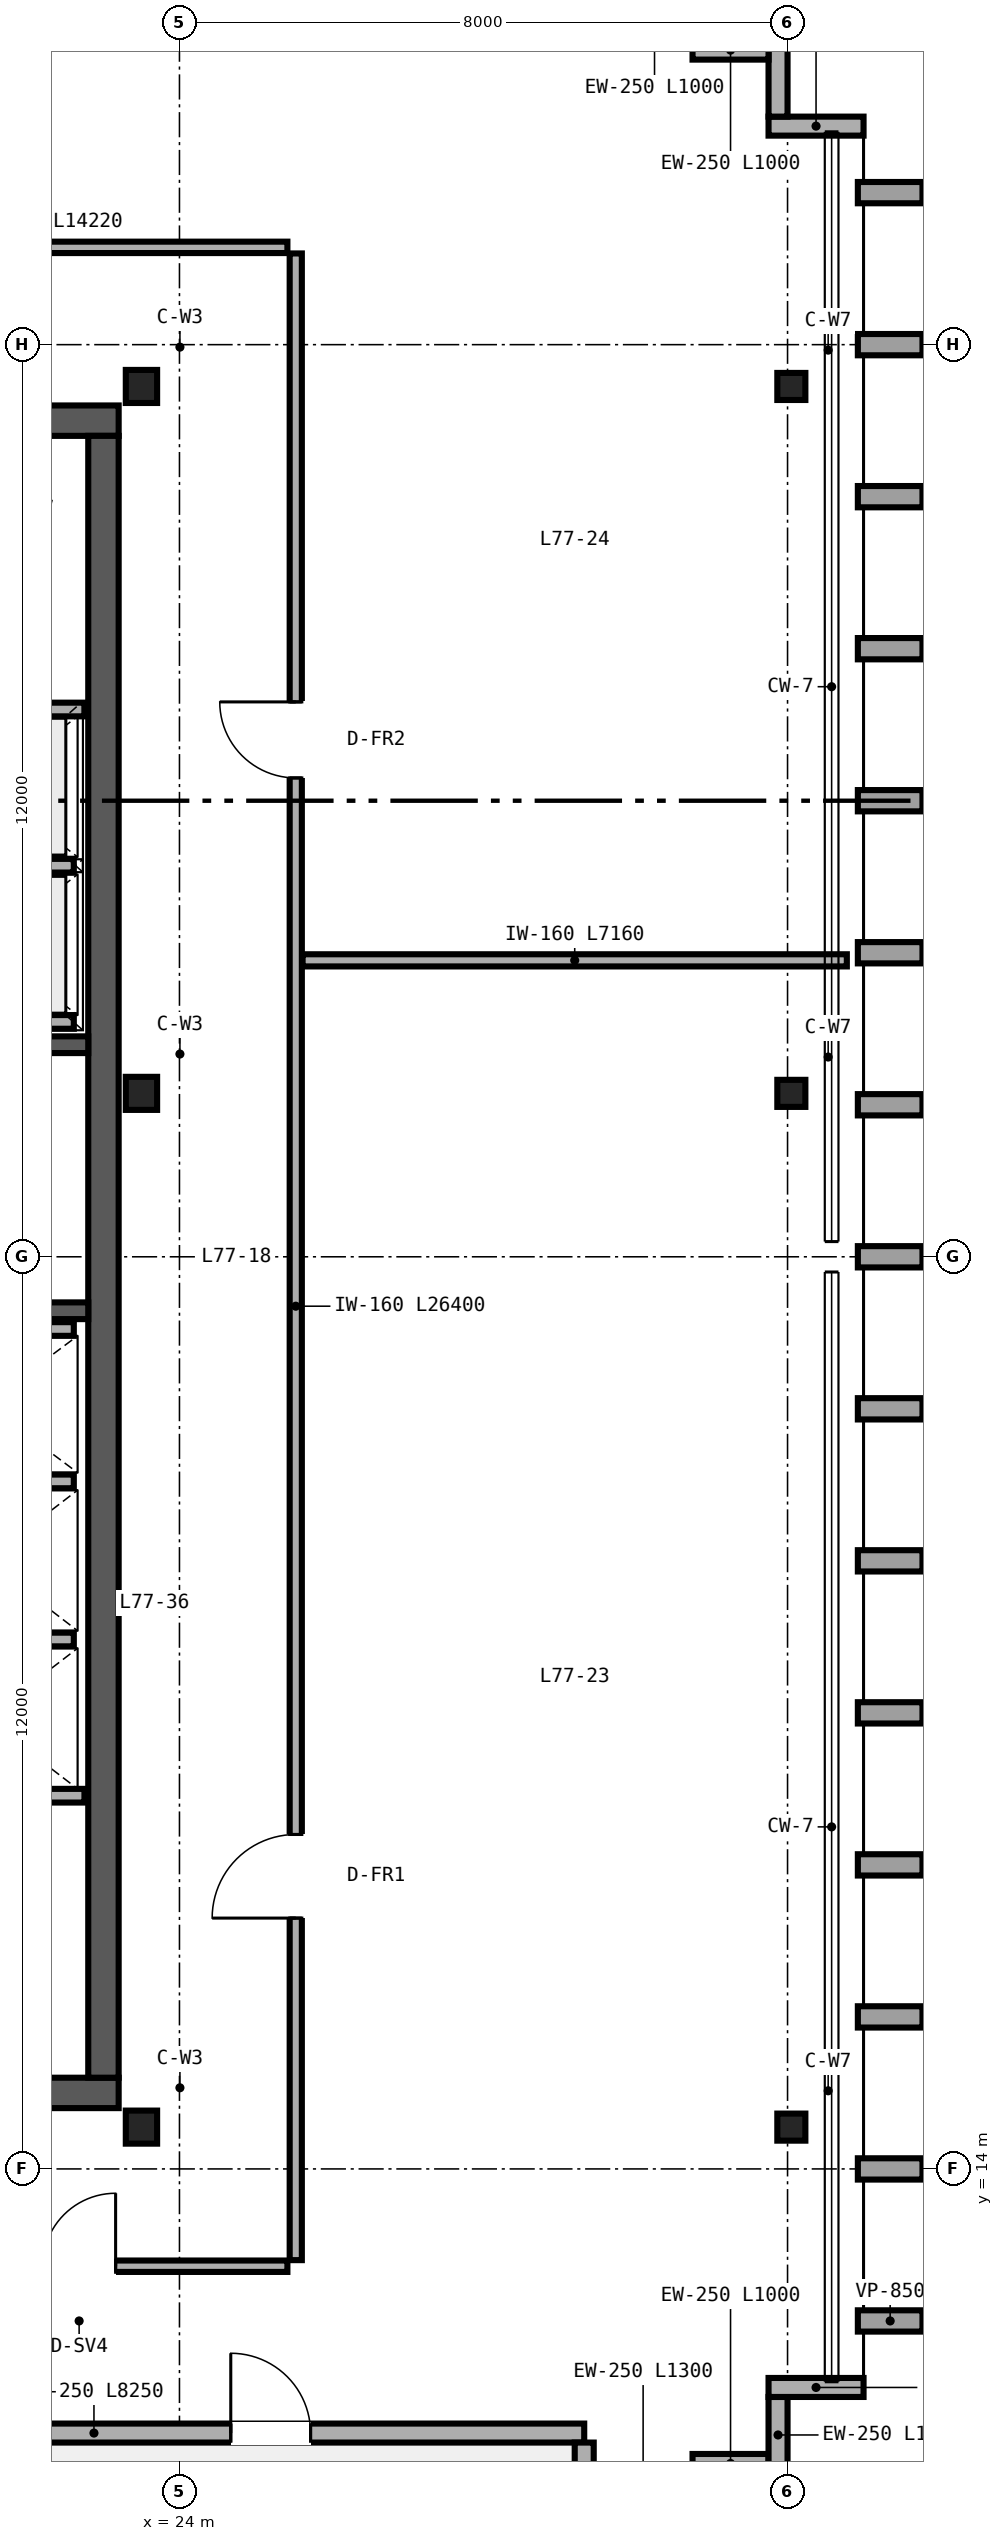
"""IFC4 building model, lengths in metres.
Left out: names, types, materials, properties, quantities, classifications, styles, units other than length and angle.
Written with IfcOpenShell. Run it as: python <this file> out.ifc"""

import sys

from ifc_helpers import new_model, si_unit, direction, frame, frame_2d, origin, origin_2d, place, context, subcontext, project, spatial, rectangle, i_section, extrude, source, transform, mapped, element, fill, save


model = new_model("IFC4")
c1 = context("Model", 3, precision=1e-05, world=origin(), true_north=direction((0.0, 1.0)))
c2 = subcontext(c1, "Body", "Model", "MODEL_VIEW")
j1 = project(units=[si_unit("LENGTHUNIT", "METRE"), si_unit("PLANEANGLEUNIT", "RADIAN")], contexts=[c1])
p1 = place(None, origin())
s1 = spatial("IfcSite", under=j1, at=p1, CompositionType="ELEMENT")
p2 = place(p1, origin())
s2 = spatial("IfcBuilding", under=s1, at=p2, CompositionType="ELEMENT")
p3 = place(p2, frame((0.0, 0.0, 301.2)))
s3 = spatial("IfcBuildingStorey", under=s2, at=p3, CompositionType="ELEMENT", Elevation=301.2)
p4 = place(p3, frame((10.8, 15.0, 0.0), z_axis=(0.0, 0.0, 1.0), x_axis=(1.0, 0.0, 0.0)))
e1 = element("IfcWall", 1, at=p4, inside=s3, PredefinedType="SHEAR", context=c2, shape_type="SweptSolid", body=[
    extrude(rectangle(XDim=12.4, YDim=0.4, at=frame_2d((6.2, 0.0))), origin(), (0.0, 0.0, 1.0), 3.92),
])
p5 = place(p4, frame((10.1, 0.0, 0.0)))
e2 = element("IfcOpeningElement", 2, at=p5, cuts=e1, PredefinedType="OPENING", context=c2, shape_type="SweptSolid", body=[
    extrude(rectangle(XDim=1.0, YDim=2.15, at=frame_2d((0.5, 1.075))), frame((0.0, 0.21, 0.0), z_axis=(0.0, -1.0, 0.0), x_axis=(1.0, 0.0, 0.0)), (0.0, 0.0, 1.0), 0.42),
])
p6 = place(p3, frame((10.8, 37.0, 0.0), z_axis=(0.0, 0.0, 1.0), x_axis=(1.0, 0.0, 0.0)))
e3 = element("IfcWall", 3, at=p6, inside=s3, PredefinedType="SHEAR", context=c2, shape_type="SweptSolid", body=[
    extrude(rectangle(XDim=12.4, YDim=0.4, at=frame_2d((6.2, 0.0))), origin(), (0.0, 0.0, 1.0), 3.92),
])
p7 = place(p6, frame((8.78, 0.0, 0.0)))
e4 = element("IfcOpeningElement", 4, at=p7, cuts=e3, PredefinedType="OPENING", context=c2, shape_type="SweptSolid", body=[
    extrude(rectangle(XDim=1.0, YDim=2.15, at=frame_2d((0.5, 1.075))), frame((0.0, 0.21, 0.0), z_axis=(0.0, -1.0, 0.0), x_axis=(1.0, 0.0, 0.0)), (0.0, 0.0, 1.0), 0.42),
])
p8 = place(p3, frame((23.0, 15.2, 0.0), z_axis=(0.0, 0.0, 1.0), x_axis=(0.0, 1.0, 0.0)))
e5 = element("IfcWall", 5, at=p8, inside=s3, PredefinedType="SHEAR", context=c2, shape_type="SweptSolid", body=[
    extrude(rectangle(XDim=21.6, YDim=0.4, at=frame_2d((10.8, 0.0))), origin(), (0.0, 0.0, 1.0), 3.92),
])
p9 = place(p3, frame((14.18, 25.29, 0.0), z_axis=(0.0, 0.0, 1.0), x_axis=(1.0, 0.0, 0.0)))
e6 = element("IfcWall", 6, at=p9, inside=s3, PredefinedType="SHEAR", context=c2, shape_type="SweptSolid", body=[
    extrude(rectangle(XDim=8.62, YDim=0.22, at=frame_2d((4.31, 0.0))), origin(), (0.0, 0.0, 1.0), 4.0),
])
p10 = place(p9, frame((0.47, 0.0, 0.0)))
e7 = element("IfcOpeningElement", 7, at=p10, cuts=e6, PredefinedType="OPENING", context=c2, shape_type="SweptSolid", body=[
    extrude(rectangle(XDim=1.05, YDim=2.15, at=frame_2d((0.525, 1.075))), frame((0.0, 0.12, 0.0), z_axis=(0.0, -1.0, 0.0), x_axis=(1.0, 0.0, 0.0)), (0.0, 0.0, 1.0), 0.24),
])
p11 = place(p3, frame((14.18, 28.79, 0.0), z_axis=(0.0, 0.0, 1.0), x_axis=(1.0, 0.0, 0.0)))
e8 = element("IfcWall", 8, at=p11, inside=s3, PredefinedType="SHEAR", context=c2, shape_type="SweptSolid", body=[
    extrude(rectangle(XDim=8.62, YDim=0.22, at=frame_2d((4.31, 0.0))), origin(), (0.0, 0.0, 1.0), 4.0),
])
m1 = source(origin(), c2, "Body", "SweptSolid", [
    extrude(i_section(OverallWidth=0.412, OverallDepth=0.435, WebThickness=0.036, FlangeThickness=0.057, FilletRadius=0.025, at=origin_2d()), origin(), (0.0, 0.0, 1.0), 3.92),
])
for number, where, z_axis, x_axis in (
    (9, (23.5, 14.55, 0.0), (0.0, 0.0, 1.0), (1.0, 0.0, 0.0)),
    (10, (23.5, 28.15, 0.0), (0.0, 0.0, 1.0), (1.0, 0.0, 0.0)),
    (11, (23.5, 37.45, 0.0), (0.0, 0.0, 1.0), (1.0, 0.0, 0.0)),
):
    element("IfcColumn", number, at=place(p3, frame(where, z_axis=z_axis, x_axis=x_axis)), inside=s3, PredefinedType="COLUMN", context=c2, shape_type="MappedRepresentation", body=[
        mapped(m1, transform((0.0, 0.0, 0.0), scale=1.0)),
    ])
m2 = source(origin(), c2, "Body", "SweptSolid", [
    extrude(i_section(OverallWidth=0.369, OverallDepth=0.356, WebThickness=0.011, FlangeThickness=0.018, FilletRadius=0.025, at=origin_2d()), origin(), (0.0, 0.0, 1.0), 3.92),
])
for number, where, z_axis, x_axis in (
    (12, (32.05, 14.55, 0.0), (0.0, 0.0, 1.0), (1.0, 0.0, 0.0)),
    (13, (32.05, 28.15, 0.0), (0.0, 0.0, 1.0), (1.0, 0.0, 0.0)),
    (14, (32.05, 37.45, 0.0), (0.0, 0.0, 1.0), (1.0, 0.0, 0.0)),
):
    element("IfcColumn", number, at=place(p3, frame(where, z_axis=z_axis, x_axis=x_axis)), inside=s3, PredefinedType="COLUMN", context=c2, shape_type="MappedRepresentation", body=[
        mapped(m2, transform((0.0, 0.0, 0.0), scale=1.0)),
    ])
for number, where, z_axis, x_axis in (
    (15, (30.75, 10.125, 0.0), (0.0, 0.0, 1.0), (1.0, 0.0, 0.0)),
    (16, (31.875, 10.0, 0.0), (0.0, 0.0, 1.0), (0.0, 1.0, 0.0)),
):
    element("IfcWall", number, at=place(p3, frame(where, z_axis=z_axis, x_axis=x_axis)), inside=s3, PredefinedType="SOLIDWALL", context=c2, shape_type="SweptSolid", body=[
        extrude(rectangle(XDim=1.0, YDim=0.25, at=frame_2d((0.5, 0.0))), origin(), (0.0, 0.0, 1.0), 3.92),
    ])
for number, where, z_axis, x_axis in (
    (17, (31.75, 11.125, 0.0), (0.0, 0.0, 1.0), (1.0, 0.0, 0.0)),
    (18, (33.0, 40.875, 0.0), (0.0, 0.0, 1.0), (-1.0, 0.0, 0.0)),
):
    element("IfcWall", number, at=place(p3, frame(where, z_axis=z_axis, x_axis=x_axis)), inside=s3, PredefinedType="SOLIDWALL", context=c2, shape_type="SweptSolid", body=[
        extrude(rectangle(XDim=1.25, YDim=0.25, at=frame_2d((0.625, 0.0))), origin(), (0.0, 0.0, 1.0), 3.92),
    ])
for number, where, z_axis, x_axis in (
    (19, (31.875, 41.0, 0.0), (0.0, 0.0, 1.0), (0.0, 1.0, 0.0)),
    (20, (31.75, 41.875, 0.0), (0.0, 0.0, 1.0), (-1.0, 0.0, 0.0)),
):
    element("IfcWall", number, at=place(p3, frame(where, z_axis=z_axis, x_axis=x_axis)), inside=s3, PredefinedType="SOLIDWALL", context=c2, shape_type="SweptSolid", body=[
        extrude(rectangle(XDim=1.0, YDim=0.25, at=frame_2d((0.5, 0.0))), origin(), (0.0, 0.0, 1.0), 3.92),
    ])
p12 = place(p3, frame((21.075, 10.525, 0.0), z_axis=(0.0, 0.0, 1.0), x_axis=(1.0, 0.0, 0.0)))
e21 = element("IfcWall", 21, at=p12, inside=s3, PredefinedType="SOLIDWALL", context=c2, shape_type="SweptSolid", body=[
    extrude(rectangle(XDim=8.25, YDim=0.25, at=frame_2d((4.125, 0.0))), origin(), (0.0, 0.0, 1.0), 3.92),
])
p13 = place(p12, frame((3.6, 0.0, 0.0)))
e22 = element("IfcOpeningElement", 22, at=p13, cuts=e21, PredefinedType="OPENING", context=c2, shape_type="SweptSolid", body=[
    extrude(rectangle(XDim=1.05, YDim=2.15, at=frame_2d((0.525, 1.075))), frame((0.0, 0.135, 0.0), z_axis=(0.0, -1.0, 0.0), x_axis=(1.0, 0.0, 0.0)), (0.0, 0.0, 1.0), 0.27),
])
p14 = place(p3, frame((29.325, 8.1, 0.0), z_axis=(0.0, 0.0, 1.0), x_axis=(0.0, 1.0, 0.0)))
e23 = element("IfcWall", 23, at=p14, inside=s3, PredefinedType="SOLIDWALL", context=c2, shape_type="SweptSolid", body=[
    extrude(rectangle(XDim=2.3, YDim=0.25, at=frame_2d((1.15, 0.0))), origin(), (0.0, 0.0, 1.0), 3.92),
])
p15 = place(p3, frame((20.12, 18.91, 0.0), z_axis=(0.0, 0.0, 1.0), x_axis=(1.0, 0.0, 0.0)))
e24 = element("IfcWall", 24, at=p15, inside=s3, PredefinedType="SOLIDWALL", context=c2, shape_type="SweptSolid", body=[
    extrude(rectangle(XDim=2.63, YDim=0.18, at=frame_2d((1.315, 0.0))), origin(), (0.0, 0.0, 1.0), 3.92),
])
p16 = place(p3, frame((20.25, 25.05, 0.0), z_axis=(0.0, 0.0, 1.0), x_axis=(1.0, 0.0, 0.0)))
e25 = element("IfcWall", 25, at=p16, inside=s3, PredefinedType="SOLIDWALL", context=c2, shape_type="SweptSolid", body=[
    extrude(rectangle(XDim=2.36, YDim=0.18, at=frame_2d((1.18, 0.0))), origin(), (0.0, 0.0, 1.0), 3.92),
])
p17 = place(p3, frame((20.25, 20.965, 0.0), z_axis=(0.0, 0.0, 1.0), x_axis=(1.0, 0.0, 0.0)))
e26 = element("IfcWall", 26, at=p17, inside=s3, PredefinedType="SOLIDWALL", context=c2, shape_type="SweptSolid", body=[
    extrude(rectangle(XDim=2.36, YDim=0.18, at=frame_2d((1.18, 0.0))), origin(), (0.0, 0.0, 1.0), 3.02),
])
for number, where, z_axis, x_axis in (
    (27, (20.25, 23.045, 0.0), (0.0, 0.0, 1.0), (1.0, 0.0, 0.0)),
    (28, (20.25, 29.09, 0.0), (0.0, 0.0, 1.0), (1.0, 0.0, 0.0)),
):
    element("IfcWall", number, at=place(p3, frame(where, z_axis=z_axis, x_axis=x_axis)), inside=s3, PredefinedType="SOLIDWALL", context=c2, shape_type="SweptSolid", body=[
        extrude(rectangle(XDim=2.36, YDim=0.18, at=frame_2d((1.18, 0.0))), origin(), (0.0, 0.0, 1.0), 3.92),
    ])
p18 = place(p3, frame((20.25, 33.2, 0.0), z_axis=(0.0, 0.0, 1.0), x_axis=(1.0, 0.0, 0.0)))
e29 = element("IfcWall", 29, at=p18, inside=s3, PredefinedType="SOLIDWALL", context=c2, shape_type="SweptSolid", body=[
    extrude(rectangle(XDim=2.5, YDim=0.18, at=frame_2d((1.25, 0.0))), origin(), (0.0, 0.0, 1.0), 3.92),
])
p19 = place(p3, frame((20.25, 31.145, 0.0), z_axis=(0.0, 0.0, 1.0), x_axis=(1.0, 0.0, 0.0)))
e30 = element("IfcWall", 30, at=p19, inside=s3, PredefinedType="SOLIDWALL", context=c2, shape_type="SweptSolid", body=[
    extrude(rectangle(XDim=2.36, YDim=0.18, at=frame_2d((1.18, 0.0))), origin(), (0.0, 0.0, 1.0), 3.92),
])
p20 = place(p3, frame((11.2, 12.72, 0.0), z_axis=(0.0, 0.0, 1.0), x_axis=(1.0, 0.0, 0.0)))
e31 = element("IfcWall", 31, at=p20, inside=s3, PredefinedType="PARTITIONING", context=c2, shape_type="SweptSolid", body=[
    extrude(rectangle(XDim=14.22, YDim=0.15, at=frame_2d((7.11, 0.0))), origin(), (0.0, 0.0, 1.0), 3.92),
])
p21 = place(p20, frame((3.8, 0.0, 0.0)))
e32 = element("IfcOpeningElement", 32, at=p21, cuts=e31, PredefinedType="OPENING", context=c2, shape_type="SweptSolid", body=[
    extrude(rectangle(XDim=1.0, YDim=2.15, at=frame_2d((0.5, 1.075))), frame((0.0, 0.085, 0.0), z_axis=(0.0, -1.0, 0.0), x_axis=(1.0, 0.0, 0.0)), (0.0, 0.0, 1.0), 0.17),
])
p22 = place(p20, frame((11.0, 0.0, 0.0)))
e33 = element("IfcOpeningElement", 33, at=p22, cuts=e31, PredefinedType="OPENING", context=c2, shape_type="SweptSolid", body=[
    extrude(rectangle(XDim=0.96, YDim=2.15, at=frame_2d((0.48, 1.075))), frame((0.0, 0.085, 0.0), z_axis=(0.0, -1.0, 0.0), x_axis=(1.0, 0.0, 0.0)), (0.0, 0.0, 1.0), 0.17),
])
p23 = place(p3, frame((25.53, 12.8, 0.0), z_axis=(0.0, 0.0, 1.0), x_axis=(0.0, 1.0, 0.0)))
e34 = element("IfcWall", 34, at=p23, inside=s3, PredefinedType="PARTITIONING", context=c2, shape_type="SweptSolid", body=[
    extrude(rectangle(XDim=26.4, YDim=0.16, at=frame_2d((13.2, 0.0))), origin(), (0.0, 0.0, 1.0), 3.064),
])
p24 = place(p23, frame((4.5, 0.0, 0.0)))
e35 = element("IfcOpeningElement", 35, at=p24, cuts=e34, PredefinedType="OPENING", context=c2, shape_type="SweptSolid", body=[
    extrude(rectangle(XDim=1.1, YDim=2.15, at=frame_2d((0.55, 1.075))), frame((0.0, 0.09, 0.0), z_axis=(0.0, -1.0, 0.0), x_axis=(1.0, 0.0, 0.0)), (0.0, 0.0, 1.0), 0.18),
])
p25 = place(p23, frame((19.5, 0.0, 0.0)))
e36 = element("IfcOpeningElement", 36, at=p25, cuts=e34, PredefinedType="OPENING", context=c2, shape_type="SweptSolid", body=[
    extrude(rectangle(XDim=1.0, YDim=2.15, at=frame_2d((0.5, 1.075))), frame((0.0, 0.09, 0.0), z_axis=(0.0, -1.0, 0.0), x_axis=(1.0, 0.0, 0.0)), (0.0, 0.0, 1.0), 0.18),
])
p26 = place(p3, frame((25.62, 29.9, 0.0), z_axis=(0.0, 0.0, 1.0), x_axis=(1.0, 0.0, 0.0)))
e37 = element("IfcWall", 37, at=p26, inside=s3, PredefinedType="PARTITIONING", context=c2, shape_type="SweptSolid", body=[
    extrude(rectangle(XDim=7.16, YDim=0.16, at=frame_2d((3.58, 0.0))), origin(), (0.0, 0.0, 1.0), 3.303),
])
p27 = place(p3, frame((11.2, 39.28, 0.0), z_axis=(0.0, 0.0, 1.0), x_axis=(1.0, 0.0, 0.0)))
e38 = element("IfcWall", 38, at=p27, inside=s3, PredefinedType="PARTITIONING", context=c2, shape_type="SweptSolid", body=[
    extrude(rectangle(XDim=14.22, YDim=0.15, at=frame_2d((7.11, 0.0))), origin(), (0.0, 0.0, 1.0), 3.92),
])
p28 = place(p27, frame((0.8, 0.0, 0.0)))
e39 = element("IfcOpeningElement", 39, at=p28, cuts=e38, PredefinedType="OPENING", context=c2, shape_type="SweptSolid", body=[
    extrude(rectangle(XDim=0.84, YDim=2.1, at=frame_2d((0.42, 1.05))), frame((0.0, 0.085, 0.0), z_axis=(0.0, -1.0, 0.0), x_axis=(1.0, 0.0, 0.0)), (0.0, 0.0, 1.0), 0.17),
])
p29 = place(p27, frame((3.1, 0.0, 0.0)))
e40 = element("IfcOpeningElement", 40, at=p29, cuts=e38, PredefinedType="OPENING", context=c2, shape_type="SweptSolid", body=[
    extrude(rectangle(XDim=0.84, YDim=2.1, at=frame_2d((0.42, 1.05))), frame((0.0, 0.085, 0.0), z_axis=(0.0, -1.0, 0.0), x_axis=(1.0, 0.0, 0.0)), (0.0, 0.0, 1.0), 0.17),
])
p30 = place(p27, frame((6.8, 0.0, 0.0)))
e41 = element("IfcOpeningElement", 41, at=p30, cuts=e38, PredefinedType="OPENING", context=c2, shape_type="SweptSolid", body=[
    extrude(rectangle(XDim=1.1, YDim=2.15, at=frame_2d((0.55, 1.075))), frame((0.0, 0.085, 0.0), z_axis=(0.0, -1.0, 0.0), x_axis=(1.0, 0.0, 0.0)), (0.0, 0.0, 1.0), 0.17),
])
m3 = source(origin(), c2, "Body", "SweptSolid", [
    extrude(rectangle(XDim=1.05, YDim=2.15, at=frame_2d((0.525, 1.075))), frame((0.0, 0.025, 0.0), z_axis=(0.0, -1.0, 0.0), x_axis=(1.0, 0.0, 0.0)), (0.0, 0.0, 1.0), 0.05),
])
p31 = place(p13, origin())
e42 = element("IfcDoor", 42, at=p31, inside=s3, OperationType="SINGLE_SWING_LEFT", PredefinedType="DOOR", context=c2, shape_type="MappedRepresentation", body=[
    mapped(m3, transform((0.0, 0.0, 0.0), scale=1.0)),
])
fill(e22, e42)
m4 = source(origin(), c2, "Body", "SweptSolid", [
    extrude(rectangle(XDim=0.96, YDim=2.15, at=frame_2d((0.48, 1.075))), frame((0.0, 0.025, 0.0), z_axis=(0.0, -1.0, 0.0), x_axis=(1.0, 0.0, 0.0)), (0.0, 0.0, 1.0), 0.05),
])
p32 = place(p22, origin())
e43 = element("IfcDoor", 43, at=p32, inside=s3, OperationType="SINGLE_SWING_RIGHT", PredefinedType="DOOR", context=c2, shape_type="MappedRepresentation", body=[
    mapped(m4, transform((0.0, 0.0, 0.0), scale=1.0)),
])
fill(e33, e43)
m5 = source(origin(), c2, "Body", "SweptSolid", [
    extrude(rectangle(XDim=1.1, YDim=2.15, at=frame_2d((0.55, 1.075))), frame((0.0, 0.025, 0.0), z_axis=(0.0, -1.0, 0.0), x_axis=(1.0, 0.0, 0.0)), (0.0, 0.0, 1.0), 0.05),
])
p33 = place(p24, origin())
e44 = element("IfcDoor", 44, at=p33, inside=s3, OperationType="SINGLE_SWING_LEFT", PredefinedType="DOOR", context=c2, shape_type="MappedRepresentation", body=[
    mapped(m5, transform((0.0, 0.0, 0.0), scale=1.0)),
])
fill(e35, e44)
m6 = source(origin(), c2, "Body", "SweptSolid", [
    extrude(rectangle(XDim=1.0, YDim=2.15, at=frame_2d((0.5, 1.075))), frame((0.0, 0.025, 0.0), z_axis=(0.0, -1.0, 0.0), x_axis=(1.0, 0.0, 0.0)), (0.0, 0.0, 1.0), 0.05),
])
p34 = place(p25, origin())
e45 = element("IfcDoor", 45, at=p34, inside=s3, OperationType="SINGLE_SWING_RIGHT", PredefinedType="DOOR", context=c2, shape_type="MappedRepresentation", body=[
    mapped(m6, transform((0.0, 0.0, 0.0), scale=1.0)),
])
fill(e36, e45)
save(model, sys.argv[1])
